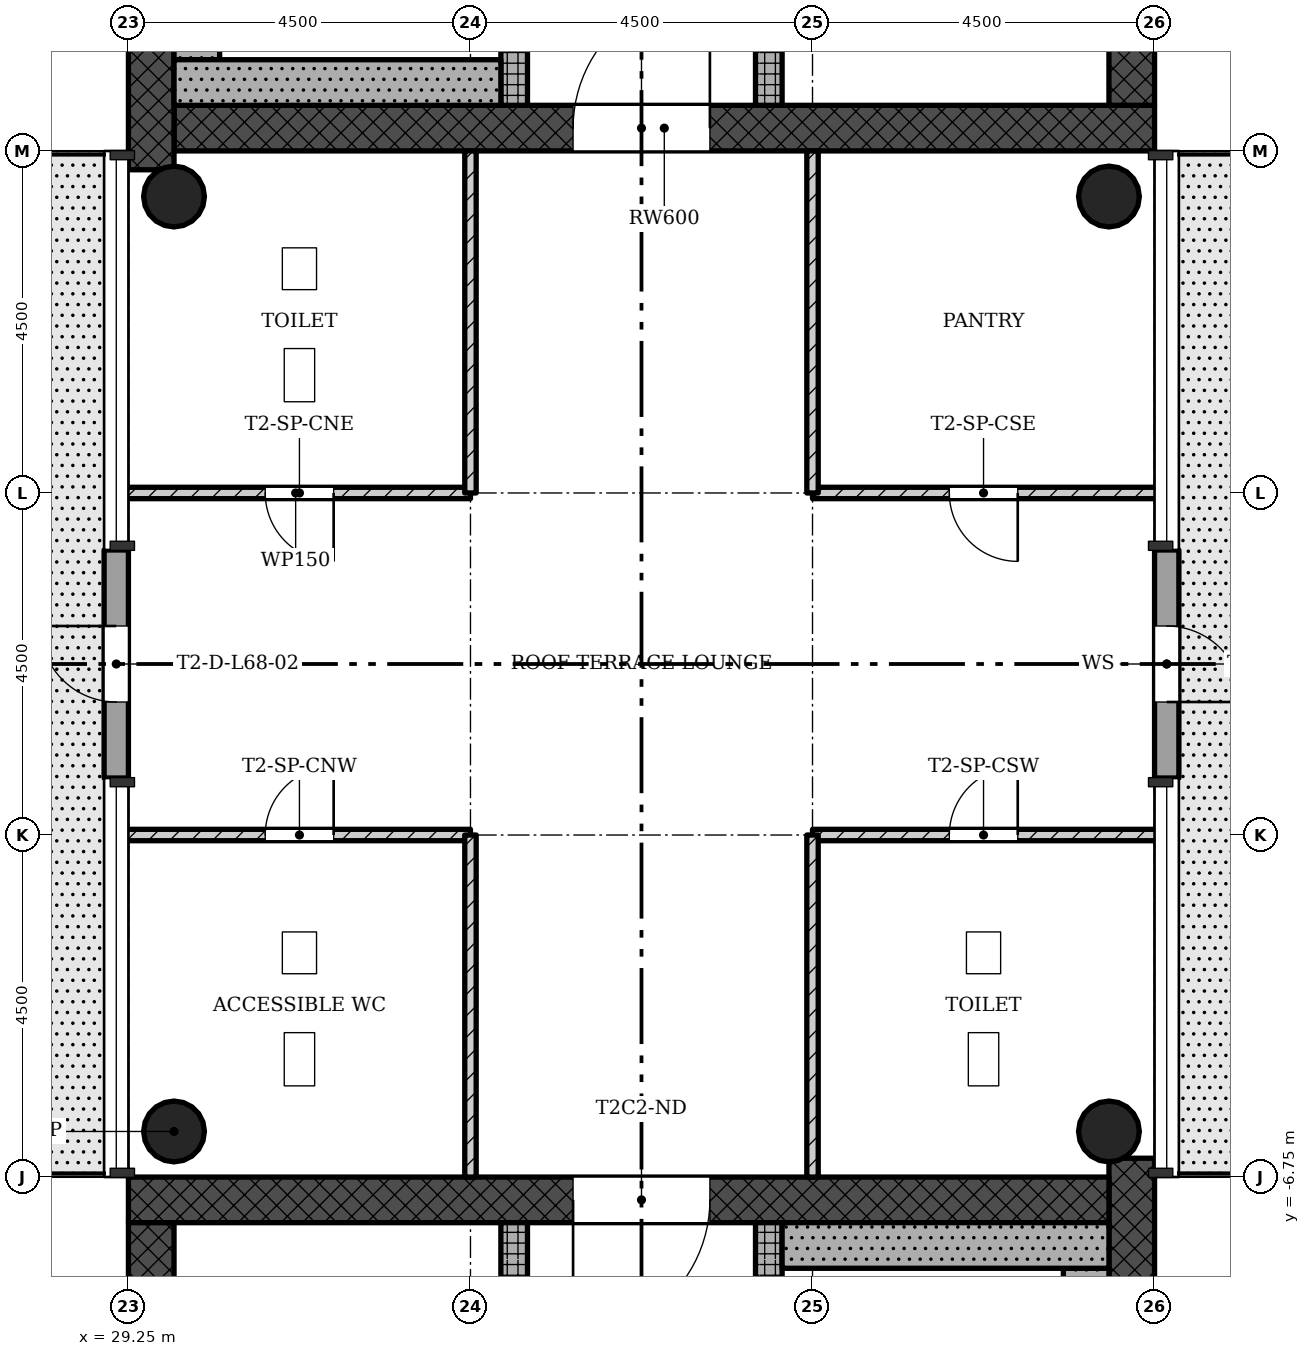
"""IFC4 building model, lengths in metres.
Left out: names, types, materials, properties, quantities, classifications, styles, units other than length and angle.
Written with IfcOpenShell. Run it as: python <this file> out.ifc"""

import sys

from ifc_helpers import new_model, si_unit, direction, frame, frame_2d, origin, origin_2d, place, context, subcontext, project, spatial, rectangle, hollow_circle, extrude, element, fill, save


model = new_model("IFC4")
c1 = context("Model", 3, precision=1e-05, world=origin(), true_north=direction((0.0, 1.0)))
c2 = subcontext(c1, "Body", "Model", "MODEL_VIEW")
j1 = project(units=[si_unit("LENGTHUNIT", "METRE"), si_unit("PLANEANGLEUNIT", "RADIAN")], contexts=[c1])
p1 = place(None, origin())
s1 = spatial("IfcSite", under=j1, at=p1, CompositionType="ELEMENT")
p2 = place(p1, origin())
s2 = spatial("IfcBuilding", under=s1, at=p2, CompositionType="ELEMENT")
p3 = place(p2, frame((0.0, 0.0, 246.9)))
s3 = spatial("IfcBuildingStorey", under=s2, at=p3, CompositionType="ELEMENT", Elevation=246.9)
p4 = place(p3, frame((29.85, 7.05, 0.0), z_axis=(0.0, 0.0, 1.0), x_axis=(1.0, 0.0, 0.0)))
e1 = element("IfcWall", 1, at=p4, inside=s3, PredefinedType="SHEAR", context=c2, shape_type="SweptSolid", body=[
    extrude(rectangle(XDim=12.9, YDim=0.6, at=frame_2d((6.45, 0.0))), origin(), (0.0, 0.0, 1.0), 4.5),
])
p5 = place(p4, frame((5.25, 0.0, 0.0)))
e2 = element("IfcOpeningElement", 2, at=p5, cuts=e1, PredefinedType="OPENING", context=c2, shape_type="SweptSolid", body=[
    extrude(rectangle(XDim=1.8, YDim=2.1, at=frame_2d((0.9, 1.05))), frame((0.0, 0.31, 0.0), z_axis=(0.0, -1.0, 0.0), x_axis=(1.0, 0.0, 0.0)), (0.0, 0.0, 1.0), 0.62),
])
p6 = place(p3, frame((42.45, 7.35, 0.0), z_axis=(0.0, 0.0, 1.0), x_axis=(0.0, 1.0, 0.0)))
e3 = element("IfcWall", 3, at=p6, inside=s3, PredefinedType="SHEAR", context=c2, shape_type="SweptSolid", body=[
    extrude(rectangle(XDim=8.4, YDim=0.6, at=frame_2d((4.2, 0.0))), origin(), (0.0, 0.0, 1.0), 4.5),
])
p7 = place(p3, frame((29.55, 15.15, 0.0), z_axis=(0.0, 0.0, 1.0), x_axis=(0.0, -1.0, 0.0)))
e4 = element("IfcWall", 4, at=p7, inside=s3, PredefinedType="SHEAR", context=c2, shape_type="SweptSolid", body=[
    extrude(rectangle(XDim=8.648, YDim=0.6, at=frame_2d((4.324, 0.0))), origin(), (0.0, 0.0, 1.0), 4.5),
])
p8 = place(p3, frame((34.325, 7.35, 0.0), z_axis=(0.0, 0.0, 1.0), x_axis=(0.0, 1.0, 0.0)))
e5 = element("IfcWall", 5, at=p8, inside=s3, PredefinedType="SHEAR", context=c2, shape_type="SweptSolid", body=[
    extrude(rectangle(XDim=7.8, YDim=0.35, at=frame_2d((3.9, 0.0))), origin(), (0.0, 0.0, 1.0), 4.5),
])
p9 = place(p8, frame((1.05, 0.0, 0.0)))
e6 = element("IfcOpeningElement", 6, at=p9, cuts=e5, PredefinedType="OPENING", context=c2, shape_type="SweptSolid", body=[
    extrude(rectangle(XDim=0.9, YDim=2.1, at=frame_2d((0.45, 1.05))), frame((0.0, 0.185, 0.0), z_axis=(0.0, -1.0, 0.0), x_axis=(1.0, 0.0, 0.0)), (0.0, 0.0, 1.0), 0.37),
])
p10 = place(p3, frame((37.675, 7.35, 0.0), z_axis=(0.0, 0.0, 1.0), x_axis=(0.0, 1.0, 0.0)))
e7 = element("IfcWall", 7, at=p10, inside=s3, PredefinedType="SHEAR", context=c2, shape_type="SweptSolid", body=[
    extrude(rectangle(XDim=7.8, YDim=0.35, at=frame_2d((3.9, 0.0))), origin(), (0.0, 0.0, 1.0), 4.5),
])
p11 = place(p10, frame((1.15, 0.0, 0.0)))
e8 = element("IfcOpeningElement", 8, at=p11, cuts=e7, PredefinedType="OPENING", context=c2, shape_type="SweptSolid", body=[
    extrude(rectangle(XDim=1.1, YDim=2.1, at=frame_2d((0.55, 1.05))), frame((0.0, 0.185, 0.0), z_axis=(0.0, -1.0, 0.0), x_axis=(1.0, 0.0, 0.0)), (0.0, 0.0, 1.0), 0.37),
])
p12 = place(p10, frame((3.35, 0.0, 0.0)))
e9 = element("IfcOpeningElement", 9, at=p12, cuts=e7, PredefinedType="OPENING", context=c2, shape_type="SweptSolid", body=[
    extrude(rectangle(XDim=1.1, YDim=2.1, at=frame_2d((0.55, 1.05))), frame((0.0, 0.185, 0.0), z_axis=(0.0, -1.0, 0.0), x_axis=(1.0, 0.0, 0.0)), (0.0, 0.0, 1.0), 0.37),
])
p13 = place(p10, frame((5.55, 0.0, 0.0)))
e10 = element("IfcOpeningElement", 10, at=p13, cuts=e7, PredefinedType="OPENING", context=c2, shape_type="SweptSolid", body=[
    extrude(rectangle(XDim=1.1, YDim=2.1, at=frame_2d((0.55, 1.05))), frame((0.0, 0.185, 0.0), z_axis=(0.0, -1.0, 0.0), x_axis=(1.0, 0.0, 0.0)), (0.0, 0.0, 1.0), 0.37),
])
p14 = place(p3, frame((42.45, -15.15, 0.0), z_axis=(0.0, 0.0, 1.0), x_axis=(0.0, 1.0, 0.0)))
e11 = element("IfcWall", 11, at=p14, inside=s3, PredefinedType="SHEAR", context=c2, shape_type="SweptSolid", body=[
    extrude(rectangle(XDim=8.648, YDim=0.6, at=frame_2d((4.324, 0.0))), origin(), (0.0, 0.0, 1.0), 4.5),
])
p15 = place(p3, frame((42.15, -7.05, 0.0), z_axis=(0.0, 0.0, 1.0), x_axis=(-1.0, 0.0, 0.0)))
e12 = element("IfcWall", 12, at=p15, inside=s3, PredefinedType="SHEAR", context=c2, shape_type="SweptSolid", body=[
    extrude(rectangle(XDim=12.9, YDim=0.6, at=frame_2d((6.45, 0.0))), origin(), (0.0, 0.0, 1.0), 4.5),
])
p16 = place(p15, frame((5.25, 0.0, 0.0)))
e13 = element("IfcOpeningElement", 13, at=p16, cuts=e12, PredefinedType="OPENING", context=c2, shape_type="SweptSolid", body=[
    extrude(rectangle(XDim=1.8, YDim=2.1, at=frame_2d((0.9, 1.05))), frame((0.0, 0.31, 0.0), z_axis=(0.0, -1.0, 0.0), x_axis=(1.0, 0.0, 0.0)), (0.0, 0.0, 1.0), 0.62),
])
p17 = place(p3, frame((29.55, -7.35, 0.0), z_axis=(0.0, 0.0, 1.0), x_axis=(0.0, -1.0, 0.0)))
e14 = element("IfcWall", 14, at=p17, inside=s3, PredefinedType="SHEAR", context=c2, shape_type="SweptSolid", body=[
    extrude(rectangle(XDim=8.4, YDim=0.6, at=frame_2d((4.2, 0.0))), origin(), (0.0, 0.0, 1.0), 4.5),
])
p18 = place(p3, frame((34.325, -15.15, 0.0), z_axis=(0.0, 0.0, 1.0), x_axis=(0.0, 1.0, 0.0)))
e15 = element("IfcWall", 15, at=p18, inside=s3, PredefinedType="SHEAR", context=c2, shape_type="SweptSolid", body=[
    extrude(rectangle(XDim=7.8, YDim=0.35, at=frame_2d((3.9, 0.0))), origin(), (0.0, 0.0, 1.0), 4.5),
])
p19 = place(p18, frame((5.55, 0.0, 0.0)))
e16 = element("IfcOpeningElement", 16, at=p19, cuts=e15, PredefinedType="OPENING", context=c2, shape_type="SweptSolid", body=[
    extrude(rectangle(XDim=1.1, YDim=2.1, at=frame_2d((0.55, 1.05))), frame((0.0, 0.185, 0.0), z_axis=(0.0, -1.0, 0.0), x_axis=(1.0, 0.0, 0.0)), (0.0, 0.0, 1.0), 0.37),
])
p20 = place(p18, frame((1.2, 0.0, 0.0)))
e17 = element("IfcOpeningElement", 17, at=p20, cuts=e15, PredefinedType="OPENING", context=c2, shape_type="SweptSolid", body=[
    extrude(rectangle(XDim=1.1, YDim=2.1, at=frame_2d((0.55, 1.05))), frame((0.0, 0.185, 0.0), z_axis=(0.0, -1.0, 0.0), x_axis=(1.0, 0.0, 0.0)), (0.0, 0.0, 1.0), 0.37),
])
p21 = place(p18, frame((3.5, 0.0, 0.0)))
e18 = element("IfcOpeningElement", 18, at=p21, cuts=e15, PredefinedType="OPENING", context=c2, shape_type="SweptSolid", body=[
    extrude(rectangle(XDim=0.9, YDim=2.1, at=frame_2d((0.45, 1.05))), frame((0.0, 0.185, 0.0), z_axis=(0.0, -1.0, 0.0), x_axis=(1.0, 0.0, 0.0)), (0.0, 0.0, 1.0), 0.37),
])
p22 = place(p3, frame((37.675, -15.15, 0.0), z_axis=(0.0, 0.0, 1.0), x_axis=(0.0, 1.0, 0.0)))
e19 = element("IfcWall", 19, at=p22, inside=s3, PredefinedType="SHEAR", context=c2, shape_type="SweptSolid", body=[
    extrude(rectangle(XDim=7.8, YDim=0.35, at=frame_2d((3.9, 0.0))), origin(), (0.0, 0.0, 1.0), 4.5),
])
p23 = place(p22, frame((5.85, 0.0, 0.0)))
e20 = element("IfcOpeningElement", 20, at=p23, cuts=e19, PredefinedType="OPENING", context=c2, shape_type="SweptSolid", body=[
    extrude(rectangle(XDim=0.9, YDim=2.1, at=frame_2d((0.45, 1.05))), frame((0.0, 0.185, 0.0), z_axis=(0.0, -1.0, 0.0), x_axis=(1.0, 0.0, 0.0)), (0.0, 0.0, 1.0), 0.37),
])
for number, where, z_axis, x_axis in (
    (21, (42.15, -6.15, 0.0), (0.0, 0.0, 1.0), (1.0, 0.0, 0.0)),
    (22, (42.15, 6.15, 0.0), (0.0, 0.0, 1.0), (1.0, 0.0, 0.0)),
    (23, (29.85, 6.15, 0.0), (0.0, 0.0, 1.0), (1.0, 0.0, 0.0)),
    (24, (29.85, -6.15, 0.0), (0.0, 0.0, 1.0), (1.0, 0.0, 0.0)),
):
    element("IfcColumn", number, at=place(p3, frame(where, z_axis=z_axis, x_axis=x_axis)), inside=s3, PredefinedType="COLUMN", context=c2, shape_type="SweptSolid", body=[
        extrude(hollow_circle(Radius=0.4, WallThickness=0.028, at=origin_2d()), origin(), (0.0, 0.0, 1.0), 4.5),
    ])
p24 = place(p3, frame((42.91, -1.5, -0.02), z_axis=(0.0, 0.0, 1.0), x_axis=(0.0, 1.0, 0.0)))
e25 = element("IfcWall", 25, at=p24, inside=s3, PredefinedType="STANDARD", context=c2, shape_type="SweptSolid", body=[
    extrude(rectangle(XDim=3.0, YDim=0.32, at=frame_2d((1.5, 0.0))), origin(), (0.0, 0.0, 1.0), 4.22),
])
p25 = place(p24, frame((1.0, 0.0, 0.02)))
e26 = element("IfcOpeningElement", 26, at=p25, cuts=e25, PredefinedType="OPENING", context=c2, shape_type="SweptSolid", body=[
    extrude(rectangle(XDim=1.0, YDim=2.1, at=frame_2d((0.5, 1.05))), frame((0.0, 0.17, 0.0), z_axis=(0.0, -1.0, 0.0), x_axis=(1.0, 0.0, 0.0)), (0.0, 0.0, 1.0), 0.34),
])
p26 = place(p3, frame((29.09, 1.5, -0.02), z_axis=(0.0, 0.0, 1.0), x_axis=(0.0, -1.0, 0.0)))
e27 = element("IfcWall", 27, at=p26, inside=s3, PredefinedType="STANDARD", context=c2, shape_type="SweptSolid", body=[
    extrude(rectangle(XDim=3.0, YDim=0.32, at=frame_2d((1.5, 0.0))), origin(), (0.0, 0.0, 1.0), 4.22),
])
p27 = place(p26, frame((1.0, 0.0, 0.02)))
e28 = element("IfcOpeningElement", 28, at=p27, cuts=e27, PredefinedType="OPENING", context=c2, shape_type="SweptSolid", body=[
    extrude(rectangle(XDim=1.0, YDim=2.1, at=frame_2d((0.5, 1.05))), frame((0.0, 0.17, 0.0), z_axis=(0.0, -1.0, 0.0), x_axis=(1.0, 0.0, 0.0)), (0.0, 0.0, 1.0), 0.34),
])
p28 = place(p3, frame((33.75, 2.25, 0.0), z_axis=(0.0, 0.0, 1.0), x_axis=(-1.0, 0.0, 0.0)))
e29 = element("IfcWall", 29, at=p28, inside=s3, PredefinedType="PARTITIONING", context=c2, shape_type="SweptSolid", body=[
    extrude(rectangle(XDim=4.6, YDim=0.15, at=frame_2d((2.3, 0.0))), origin(), (0.0, 0.0, 1.0), 4.1),
])
p29 = place(p28, frame((1.8, 0.0, 0.0)))
e30 = element("IfcOpeningElement", 30, at=p29, cuts=e29, PredefinedType="OPENING", context=c2, shape_type="SweptSolid", body=[
    extrude(rectangle(XDim=0.9, YDim=2.1, at=frame_2d((0.45, 1.05))), frame((0.0, 0.085, 0.0), z_axis=(0.0, -1.0, 0.0), x_axis=(1.0, 0.0, 0.0)), (0.0, 0.0, 1.0), 0.17),
])
p30 = place(p3, frame((33.75, 2.25, 0.0), z_axis=(0.0, 0.0, 1.0), x_axis=(0.0, 1.0, 0.0)))
e31 = element("IfcWall", 31, at=p30, inside=s3, PredefinedType="PARTITIONING", context=c2, shape_type="SweptSolid", body=[
    extrude(rectangle(XDim=4.5, YDim=0.15, at=frame_2d((2.25, 0.0))), origin(), (0.0, 0.0, 1.0), 4.1),
])
p31 = place(p3, frame((42.85, 2.25, 0.0), z_axis=(0.0, 0.0, 1.0), x_axis=(-1.0, 0.0, 0.0)))
e32 = element("IfcWall", 32, at=p31, inside=s3, PredefinedType="PARTITIONING", context=c2, shape_type="SweptSolid", body=[
    extrude(rectangle(XDim=4.6, YDim=0.15, at=frame_2d((2.3, 0.0))), origin(), (0.0, 0.0, 1.0), 4.1),
])
p32 = place(p31, frame((1.9, 0.0, 0.0)))
e33 = element("IfcOpeningElement", 33, at=p32, cuts=e32, PredefinedType="OPENING", context=c2, shape_type="SweptSolid", body=[
    extrude(rectangle(XDim=0.9, YDim=2.1, at=frame_2d((0.45, 1.05))), frame((0.0, 0.085, 0.0), z_axis=(0.0, -1.0, 0.0), x_axis=(1.0, 0.0, 0.0)), (0.0, 0.0, 1.0), 0.17),
])
p33 = place(p3, frame((38.25, 2.25, 0.0), z_axis=(0.0, 0.0, 1.0), x_axis=(0.0, 1.0, 0.0)))
e34 = element("IfcWall", 34, at=p33, inside=s3, PredefinedType="PARTITIONING", context=c2, shape_type="SweptSolid", body=[
    extrude(rectangle(XDim=4.5, YDim=0.15, at=frame_2d((2.25, 0.0))), origin(), (0.0, 0.0, 1.0), 4.1),
])
p34 = place(p3, frame((33.75, -2.25, 0.0), z_axis=(0.0, 0.0, 1.0), x_axis=(-1.0, 0.0, 0.0)))
e35 = element("IfcWall", 35, at=p34, inside=s3, PredefinedType="PARTITIONING", context=c2, shape_type="SweptSolid", body=[
    extrude(rectangle(XDim=4.6, YDim=0.15, at=frame_2d((2.3, 0.0))), origin(), (0.0, 0.0, 1.0), 4.1),
])
p35 = place(p34, frame((1.8, 0.0, 0.0)))
e36 = element("IfcOpeningElement", 36, at=p35, cuts=e35, PredefinedType="OPENING", context=c2, shape_type="SweptSolid", body=[
    extrude(rectangle(XDim=0.9, YDim=2.1, at=frame_2d((0.45, 1.05))), frame((0.0, 0.085, 0.0), z_axis=(0.0, -1.0, 0.0), x_axis=(1.0, 0.0, 0.0)), (0.0, 0.0, 1.0), 0.17),
])
p36 = place(p3, frame((33.75, -6.75, 0.0), z_axis=(0.0, 0.0, 1.0), x_axis=(0.0, 1.0, 0.0)))
e37 = element("IfcWall", 37, at=p36, inside=s3, PredefinedType="PARTITIONING", context=c2, shape_type="SweptSolid", body=[
    extrude(rectangle(XDim=4.5, YDim=0.15, at=frame_2d((2.25, 0.0))), origin(), (0.0, 0.0, 1.0), 4.1),
])
p37 = place(p3, frame((42.85, -2.25, 0.0), z_axis=(0.0, 0.0, 1.0), x_axis=(-1.0, 0.0, 0.0)))
e38 = element("IfcWall", 38, at=p37, inside=s3, PredefinedType="PARTITIONING", context=c2, shape_type="SweptSolid", body=[
    extrude(rectangle(XDim=4.6, YDim=0.15, at=frame_2d((2.3, 0.0))), origin(), (0.0, 0.0, 1.0), 4.1),
])
p38 = place(p37, frame((1.9, 0.0, 0.0)))
e39 = element("IfcOpeningElement", 39, at=p38, cuts=e38, PredefinedType="OPENING", context=c2, shape_type="SweptSolid", body=[
    extrude(rectangle(XDim=0.9, YDim=2.1, at=frame_2d((0.45, 1.05))), frame((0.0, 0.085, 0.0), z_axis=(0.0, -1.0, 0.0), x_axis=(1.0, 0.0, 0.0)), (0.0, 0.0, 1.0), 0.17),
])
p39 = place(p3, frame((38.25, -6.75, 0.0), z_axis=(0.0, 0.0, 1.0), x_axis=(0.0, 1.0, 0.0)))
e40 = element("IfcWall", 40, at=p39, inside=s3, PredefinedType="PARTITIONING", context=c2, shape_type="SweptSolid", body=[
    extrude(rectangle(XDim=4.5, YDim=0.15, at=frame_2d((2.25, 0.0))), origin(), (0.0, 0.0, 1.0), 4.1),
])
p40 = place(p3, frame((30.15, 7.95, 0.0), z_axis=(0.0, 0.0, 1.0), x_axis=(0.0, 1.0, 0.0)))
e41 = element("IfcWall", 41, at=p40, inside=s3, PredefinedType="SHEAR", context=c2, shape_type="SweptSolid", body=[
    extrude(rectangle(XDim=6.6, YDim=0.6, at=frame_2d((3.3, 0.0))), origin(), (0.0, 0.0, 1.0), 4.5),
])
p41 = place(p3, frame((34.15, 7.65, 0.0), z_axis=(0.0, 0.0, 1.0), x_axis=(-1.0, 0.0, 0.0)))
e42 = element("IfcWall", 42, at=p41, inside=s3, PredefinedType="SHEAR", context=c2, shape_type="SweptSolid", body=[
    extrude(rectangle(XDim=4.3, YDim=0.6, at=frame_2d((2.15, 0.0))), origin(), (0.0, 0.0, 1.0), 4.5),
])
p42 = place(p3, frame((41.85, -7.95, 0.0), z_axis=(0.0, 0.0, 1.0), x_axis=(0.0, -1.0, 0.0)))
e43 = element("IfcWall", 43, at=p42, inside=s3, PredefinedType="SHEAR", context=c2, shape_type="SweptSolid", body=[
    extrude(rectangle(XDim=6.6, YDim=0.6, at=frame_2d((3.3, 0.0))), origin(), (0.0, 0.0, 1.0), 4.5),
])
p43 = place(p3, frame((37.85, -7.65, 0.0), z_axis=(0.0, 0.0, 1.0), x_axis=(1.0, 0.0, 0.0)))
e44 = element("IfcWall", 44, at=p43, inside=s3, PredefinedType="SHEAR", context=c2, shape_type="SweptSolid", body=[
    extrude(rectangle(XDim=4.3, YDim=0.6, at=frame_2d((2.15, 0.0))), origin(), (0.0, 0.0, 1.0), 4.5),
])
p44 = place(p25, origin())
e45 = element("IfcDoor", 45, at=p44, inside=s3, OperationType="SINGLE_SWING_LEFT", PredefinedType="DOOR", context=c2, shape_type="SweptSolid", body=[
    extrude(rectangle(XDim=1.0, YDim=2.1, at=frame_2d((0.5, 1.05))), frame((0.0, 0.025, 0.0), z_axis=(0.0, -1.0, 0.0), x_axis=(1.0, 0.0, 0.0)), (0.0, 0.0, 1.0), 0.05),
])
fill(e26, e45)
p45 = place(p27, origin())
e46 = element("IfcDoor", 46, at=p45, inside=s3, OperationType="SINGLE_SWING_LEFT", PredefinedType="DOOR", context=c2, shape_type="SweptSolid", body=[
    extrude(rectangle(XDim=1.0, YDim=2.1, at=frame_2d((0.5, 1.05))), frame((0.0, 0.025, 0.0), z_axis=(0.0, -1.0, 0.0), x_axis=(1.0, 0.0, 0.0)), (0.0, 0.0, 1.0), 0.05),
])
fill(e28, e46)
p46 = place(p29, origin())
e47 = element("IfcDoor", 47, at=p46, inside=s3, OperationType="SINGLE_SWING_RIGHT", PredefinedType="DOOR", context=c2, shape_type="SweptSolid", body=[
    extrude(rectangle(XDim=0.9, YDim=2.1, at=frame_2d((0.45, 1.05))), frame((0.0, 0.025, 0.0), z_axis=(0.0, -1.0, 0.0), x_axis=(1.0, 0.0, 0.0)), (0.0, 0.0, 1.0), 0.05),
])
fill(e30, e47)
p47 = place(p32, origin())
e48 = element("IfcDoor", 48, at=p47, inside=s3, OperationType="SINGLE_SWING_RIGHT", PredefinedType="DOOR", context=c2, shape_type="SweptSolid", body=[
    extrude(rectangle(XDim=0.9, YDim=2.1, at=frame_2d((0.45, 1.05))), frame((0.0, 0.025, 0.0), z_axis=(0.0, -1.0, 0.0), x_axis=(1.0, 0.0, 0.0)), (0.0, 0.0, 1.0), 0.05),
])
fill(e33, e48)
p48 = place(p35, origin())
e49 = element("IfcDoor", 49, at=p48, inside=s3, OperationType="SINGLE_SWING_LEFT", PredefinedType="DOOR", context=c2, shape_type="SweptSolid", body=[
    extrude(rectangle(XDim=0.9, YDim=2.1, at=frame_2d((0.45, 1.05))), frame((0.0, 0.025, 0.0), z_axis=(0.0, -1.0, 0.0), x_axis=(1.0, 0.0, 0.0)), (0.0, 0.0, 1.0), 0.05),
])
fill(e36, e49)
p49 = place(p38, origin())
e50 = element("IfcDoor", 50, at=p49, inside=s3, OperationType="SINGLE_SWING_LEFT", PredefinedType="DOOR", context=c2, shape_type="SweptSolid", body=[
    extrude(rectangle(XDim=0.9, YDim=2.1, at=frame_2d((0.45, 1.05))), frame((0.0, 0.025, 0.0), z_axis=(0.0, -1.0, 0.0), x_axis=(1.0, 0.0, 0.0)), (0.0, 0.0, 1.0), 0.05),
])
fill(e39, e50)
p50 = place(p5, origin())
e51 = element("IfcDoor", 51, at=p50, inside=s3, OperationType="SINGLE_SWING_LEFT", PredefinedType="DOOR", context=c2, shape_type="SweptSolid", body=[
    extrude(rectangle(XDim=1.8, YDim=2.1, at=frame_2d((0.9, 1.05))), frame((0.0, 0.025, 0.0), z_axis=(0.0, -1.0, 0.0), x_axis=(1.0, 0.0, 0.0)), (0.0, 0.0, 1.0), 0.05),
])
fill(e2, e51)
p51 = place(p16, origin())
e52 = element("IfcDoor", 52, at=p51, inside=s3, OperationType="SINGLE_SWING_LEFT", PredefinedType="DOOR", context=c2, shape_type="SweptSolid", body=[
    extrude(rectangle(XDim=1.8, YDim=2.1, at=frame_2d((0.9, 1.05))), frame((0.0, 0.025, 0.0), z_axis=(0.0, -1.0, 0.0), x_axis=(1.0, 0.0, 0.0)), (0.0, 0.0, 1.0), 0.05),
])
fill(e13, e52)
save(model, sys.argv[1])
